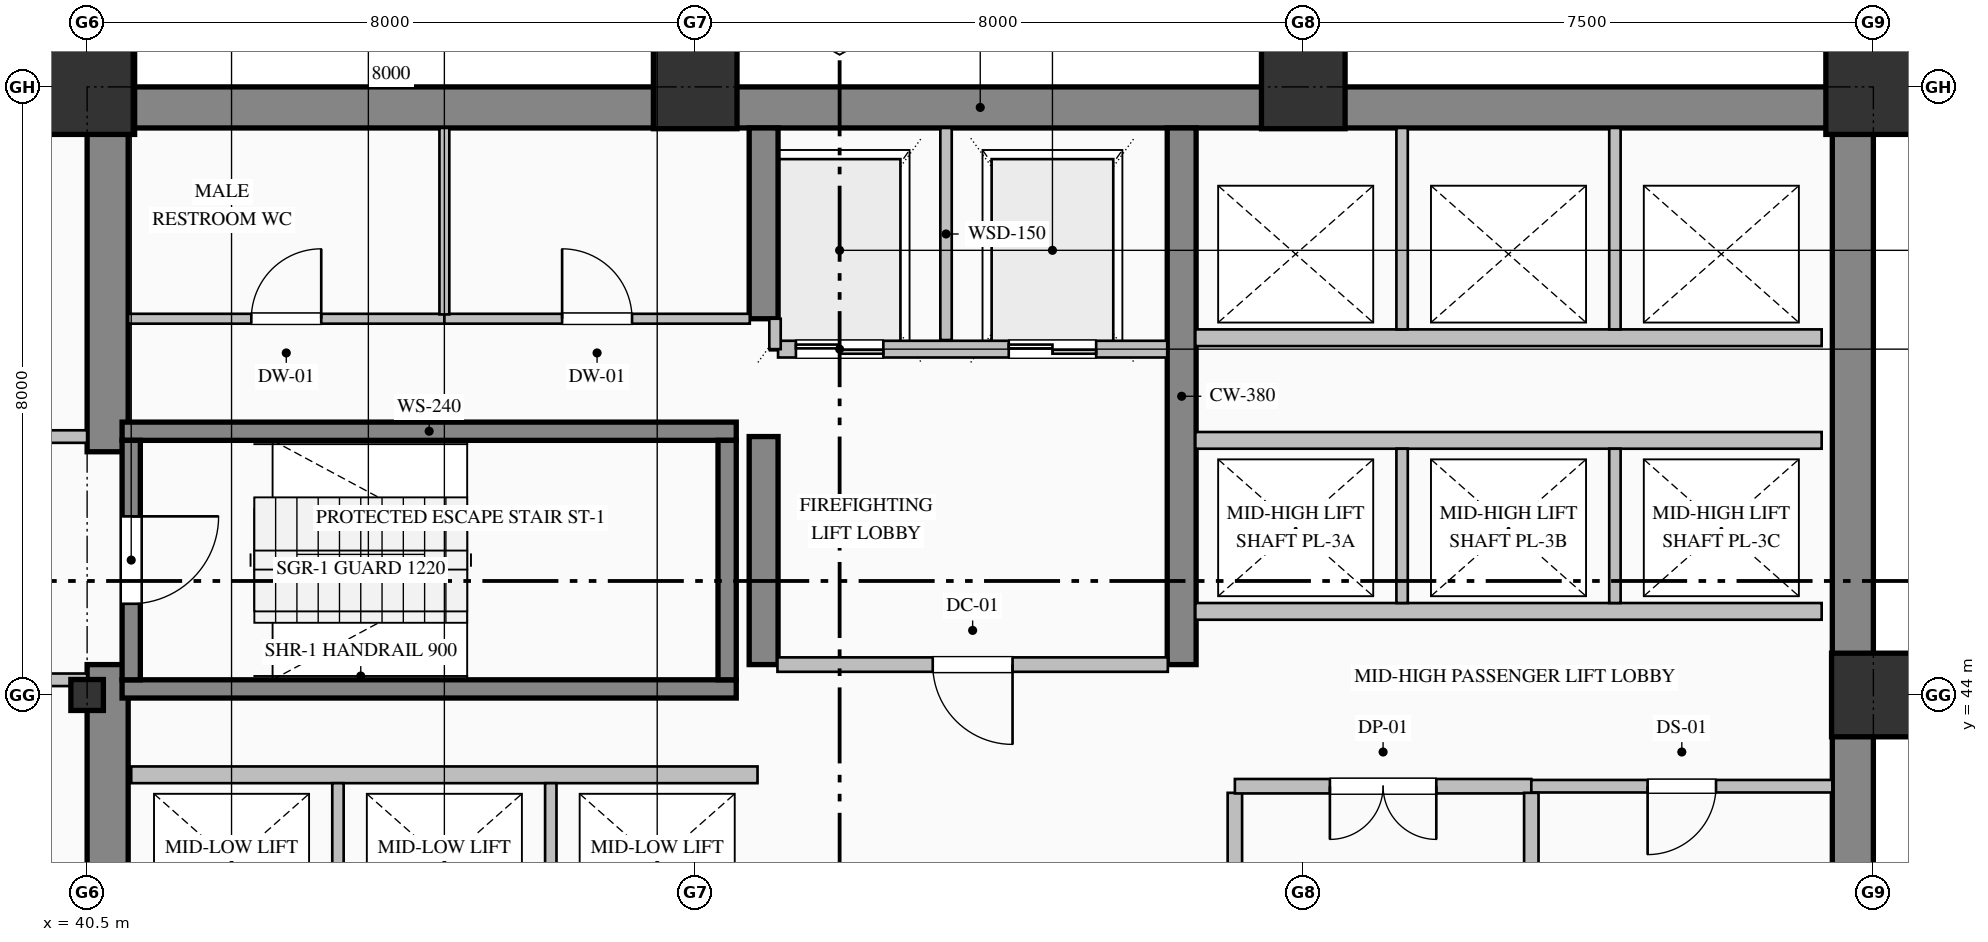
"""IFC4 building model, lengths in metres.
Left out: names, types, materials, properties, quantities, classifications, styles, units other than length and angle.
Written with IfcOpenShell. Run it as: python <this file> out.ifc"""

import sys

from ifc_helpers import new_model, si_unit, direction, frame, frame_2d, origin, origin_2d, place, context, subcontext, project, spatial, rectangle, hollow_rectangle, i_section, extrude, element, fill, save


model = new_model("IFC4")
c1 = context("Model", 3, precision=1e-05, world=origin(), true_north=direction((0.0, 1.0)))
c2 = subcontext(c1, "Body", "Model", "MODEL_VIEW")
j1 = project(units=[si_unit("LENGTHUNIT", "METRE"), si_unit("PLANEANGLEUNIT", "RADIAN")], contexts=[c1])
p1 = place(None, origin())
s1 = spatial("IfcSite", under=j1, at=p1, CompositionType="ELEMENT")
p2 = place(p1, origin())
s2 = spatial("IfcBuilding", under=s1, at=p2, CompositionType="ELEMENT")
p3 = place(p2, frame((0.0, 0.0, 100.2)))
s3 = spatial("IfcBuildingStorey", under=s2, at=p3, CompositionType="ELEMENT", Elevation=100.2)
p4 = place(p3, frame((40.5, 51.73, 0.0), z_axis=(0.0, 0.0, 1.0), x_axis=(1.0, 0.0, 0.0)))
e1 = element("IfcWall", 1, at=p4, inside=s3, PredefinedType="SHEAR", context=c2, shape_type="SweptSolid", body=[
    extrude(rectangle(XDim=23.5, YDim=0.54, at=frame_2d((11.75, 0.0))), origin(), (0.0, 0.0, 1.0), 3.75),
])
p5 = place(p3, frame((63.73, 36.32, 0.0), z_axis=(0.0, 0.0, 1.0), x_axis=(0.0, 1.0, 0.0)))
e2 = element("IfcWall", 2, at=p5, inside=s3, PredefinedType="SHEAR", context=c2, shape_type="SweptSolid", body=[
    extrude(rectangle(XDim=15.14, YDim=0.54, at=frame_2d((7.57, 0.0))), origin(), (0.0, 0.0, 1.0), 3.75),
])
p6 = place(p3, frame((40.77, 36.54, 0.0), z_axis=(0.0, 0.0, 1.0), x_axis=(0.0, 1.0, 0.0)))
e3 = element("IfcWall", 3, at=p6, inside=s3, PredefinedType="SHEAR", context=c2, shape_type="SweptSolid", body=[
    extrude(rectangle(XDim=7.86, YDim=0.54, at=frame_2d((3.93, 0.0))), origin(), (0.0, 0.0, 1.0), 3.75),
])
p7 = place(p3, frame((40.77, 47.2, 0.0), z_axis=(0.0, 0.0, 1.0), x_axis=(0.0, 1.0, 0.0)))
e4 = element("IfcWall", 4, at=p7, inside=s3, PredefinedType="SHEAR", context=c2, shape_type="SweptSolid", body=[
    extrude(rectangle(XDim=4.26, YDim=0.54, at=frame_2d((2.13, 0.0))), origin(), (0.0, 0.0, 1.0), 3.75),
])
p8 = place(p3, frame((49.4, 44.4, 0.0), z_axis=(0.0, 0.0, 1.0), x_axis=(0.0, 1.0, 0.0)))
e5 = element("IfcWall", 5, at=p8, inside=s3, PredefinedType="SHEAR", context=c2, shape_type="SweptSolid", body=[
    extrude(rectangle(XDim=3.0, YDim=0.38, at=frame_2d((1.5, 0.0))), origin(), (0.0, 0.0, 1.0), 3.75),
])
p9 = place(p3, frame((49.4, 48.95, 0.0), z_axis=(0.0, 0.0, 1.0), x_axis=(0.0, 1.0, 0.0)))
e6 = element("IfcWall", 6, at=p9, inside=s3, PredefinedType="SHEAR", context=c2, shape_type="SweptSolid", body=[
    extrude(rectangle(XDim=2.51, YDim=0.38, at=frame_2d((1.255, 0.0))), origin(), (0.0, 0.0, 1.0), 3.75),
])
p10 = place(p3, frame((54.9, 44.4, 0.0), z_axis=(0.0, 0.0, 1.0), x_axis=(0.0, 1.0, 0.0)))
e7 = element("IfcWall", 7, at=p10, inside=s3, PredefinedType="SHEAR", context=c2, shape_type="SweptSolid", body=[
    extrude(rectangle(XDim=7.06, YDim=0.38, at=frame_2d((3.53, 0.0))), origin(), (0.0, 0.0, 1.0), 3.75),
])
p11 = place(p3, frame((40.5, 44.0, 0.0), z_axis=(0.0, 0.0, 1.0), x_axis=(1.0, 0.0, 0.0)))
e8 = element("IfcColumn", 8, at=p11, inside=s3, PredefinedType="COLUMN", context=c2, shape_type="SweptSolid", body=[
    extrude(i_section(OverallWidth=0.407, OverallDepth=0.428, WebThickness=0.02, FlangeThickness=0.035, FilletRadius=0.022, at=origin_2d()), origin(), (0.0, 0.0, 1.0), 4.0),
])
p12 = place(p3, frame((40.5, 52.0, 0.0), z_axis=(0.0, 0.0, 1.0), x_axis=(1.0, 0.0, 0.0)))
e9 = element("IfcColumn", 9, at=p12, inside=s3, PredefinedType="COLUMN", context=c2, shape_type="SweptSolid", body=[
    extrude(hollow_rectangle(XDim=1.25, YDim=1.25, WallThickness=0.045, at=origin_2d()), origin(), (0.0, 0.0, 1.0), 4.0),
])
for number, where, z_axis, x_axis in (
    (10, (48.5, 52.0, 0.0), (0.0, 0.0, 1.0), (1.0, 0.0, 0.0)),
    (11, (56.5, 52.0, 0.0), (0.0, 0.0, 1.0), (1.0, 0.0, 0.0)),
    (12, (64.0, 44.0, 0.0), (0.0, 0.0, 1.0), (1.0, 0.0, 0.0)),
):
    element("IfcColumn", number, at=place(p3, frame(where, z_axis=z_axis, x_axis=x_axis)), inside=s3, PredefinedType="COLUMN", context=c2, shape_type="SweptSolid", body=[
        extrude(hollow_rectangle(XDim=1.1, YDim=1.1, WallThickness=0.04, at=origin_2d()), origin(), (0.0, 0.0, 1.0), 4.0),
    ])
p13 = place(p3, frame((64.0, 52.0, 0.0), z_axis=(0.0, 0.0, 1.0), x_axis=(1.0, 0.0, 0.0)))
e13 = element("IfcColumn", 13, at=p13, inside=s3, PredefinedType="COLUMN", context=c2, shape_type="SweptSolid", body=[
    extrude(hollow_rectangle(XDim=1.25, YDim=1.25, WallThickness=0.045, at=origin_2d()), origin(), (0.0, 0.0, 1.0), 4.0),
])
p14 = place(p3, frame((4.0, 51.82, 0.0), z_axis=(0.0, 0.0, 1.0), x_axis=(1.0, 0.0, 0.0)))
e14 = element("IfcWall", 14, at=p14, inside=s3, PredefinedType="SOLIDWALL", context=c2, shape_type="SweptSolid", body=[
    extrude(rectangle(XDim=36.52, YDim=0.36, at=frame_2d((18.26, 0.0))), origin(), (0.0, 0.0, 1.0), 3.25),
])
p15 = place(p14, frame((6.3, 0.0, 0.85)))
e15 = element("IfcOpeningElement", 15, at=p15, cuts=e14, PredefinedType="OPENING", context=c2, shape_type="SweptSolid", body=[
    extrude(rectangle(XDim=1.8, YDim=2.05, at=frame_2d((0.9, 1.025))), frame((0.0, 0.19, 0.0), z_axis=(0.0, -1.0, 0.0), x_axis=(1.0, 0.0, 0.0)), (0.0, 0.0, 1.0), 0.38),
])
p16 = place(p14, frame((17.1, 0.0, 0.85)))
e16 = element("IfcOpeningElement", 16, at=p16, cuts=e14, PredefinedType="OPENING", context=c2, shape_type="SweptSolid", body=[
    extrude(rectangle(XDim=1.8, YDim=2.05, at=frame_2d((0.9, 1.025))), frame((0.0, 0.19, 0.0), z_axis=(0.0, -1.0, 0.0), x_axis=(1.0, 0.0, 0.0)), (0.0, 0.0, 1.0), 0.38),
])
for number, where, z_axis, x_axis in (
    (17, (40.96, 47.47, 0.0), (0.0, 0.0, 1.0), (1.0, 0.0, 0.0)),
    (18, (49.04, 44.08, 0.0), (0.0, 0.0, 1.0), (-1.0, 0.0, 0.0)),
):
    element("IfcWall", number, at=place(p3, frame(where, z_axis=z_axis, x_axis=x_axis)), inside=s3, PredefinedType="SOLIDWALL", context=c2, shape_type="SweptSolid", body=[
        extrude(rectangle(XDim=8.08, YDim=0.24, at=frame_2d((4.04, 0.0))), origin(), (0.0, 0.0, 1.0), 4.0),
    ])
p17 = place(p3, frame((41.08, 47.35, 0.0), z_axis=(0.0, 0.0, 1.0), x_axis=(0.0, -1.0, 0.0)))
e19 = element("IfcWall", 19, at=p17, inside=s3, PredefinedType="SOLIDWALL", context=c2, shape_type="SweptSolid", body=[
    extrude(rectangle(XDim=3.15, YDim=0.24, at=frame_2d((1.575, 0.0))), origin(), (0.0, 0.0, 1.0), 4.0),
])
p18 = place(p17, frame((1.0, 0.0, 0.0)))
e20 = element("IfcOpeningElement", 20, at=p18, cuts=e19, PredefinedType="OPENING", context=c2, shape_type="SweptSolid", body=[
    extrude(rectangle(XDim=1.15, YDim=2.2, at=frame_2d((0.575, 1.1))), frame((0.0, 0.13, 0.0), z_axis=(0.0, -1.0, 0.0), x_axis=(1.0, 0.0, 0.0)), (0.0, 0.0, 1.0), 0.26),
])
p19 = place(p3, frame((48.92, 44.2, 0.0), z_axis=(0.0, 0.0, 1.0), x_axis=(0.0, 1.0, 0.0)))
e21 = element("IfcWall", 21, at=p19, inside=s3, PredefinedType="SOLIDWALL", context=c2, shape_type="SweptSolid", body=[
    extrude(rectangle(XDim=3.15, YDim=0.24, at=frame_2d((1.575, 0.0))), origin(), (0.0, 0.0, 1.0), 4.0),
])
p20 = place(p3, frame((54.71, 48.55, 0.0), z_axis=(0.0, 0.0, 1.0), x_axis=(-1.0, 0.0, 0.0)))
e22 = element("IfcWall", 22, at=p20, inside=s3, PredefinedType="PARTITIONING", context=c2, shape_type="SweptSolid", body=[
    extrude(rectangle(XDim=5.12, YDim=0.22, at=frame_2d((2.56, 0.0))), origin(), (0.0, 0.0, 1.0), 3.75),
])
p21 = place(p20, frame((3.735, 0.0, 0.0)))
e23 = element("IfcOpeningElement", 23, at=p21, cuts=e22, PredefinedType="OPENING", context=c2, shape_type="SweptSolid", body=[
    extrude(rectangle(XDim=1.15, YDim=2.2, at=frame_2d((0.575, 1.1))), frame((0.0, 0.12, 0.0), z_axis=(0.0, -1.0, 0.0), x_axis=(1.0, 0.0, 0.0)), (0.0, 0.0, 1.0), 0.24),
])
p22 = place(p20, frame((0.935, 0.0, 0.0)))
e24 = element("IfcOpeningElement", 24, at=p22, cuts=e22, PredefinedType="OPENING", context=c2, shape_type="SweptSolid", body=[
    extrude(rectangle(XDim=1.15, YDim=2.2, at=frame_2d((0.575, 1.1))), frame((0.0, 0.12, 0.0), z_axis=(0.0, -1.0, 0.0), x_axis=(1.0, 0.0, 0.0)), (0.0, 0.0, 1.0), 0.24),
])
p23 = place(p3, frame((51.8, 48.67, 0.0), z_axis=(0.0, 0.0, 1.0), x_axis=(0.0, 1.0, 0.0)))
e25 = element("IfcWall", 25, at=p23, inside=s3, PredefinedType="PARTITIONING", context=c2, shape_type="SweptSolid", body=[
    extrude(rectangle(XDim=2.79, YDim=0.15, at=frame_2d((1.395, 0.0))), origin(), (0.0, 0.0, 1.0), 3.75),
])
p24 = place(p3, frame((49.55, 48.55, 0.0), z_axis=(0.0, 0.0, 1.0), x_axis=(0.0, 1.0, 0.0)))
e26 = element("IfcWall", 26, at=p24, inside=s3, PredefinedType="PARTITIONING", context=c2, shape_type="SweptSolid", body=[
    extrude(rectangle(XDim=0.4, YDim=0.15, at=frame_2d((0.2, 0.0))), origin(), (0.0, 0.0, 1.0), 3.75),
])
p25 = place(p3, frame((41.08, 42.95, 0.0), z_axis=(0.0, 0.0, 1.0), x_axis=(1.0, 0.0, 0.0)))
e27 = element("IfcWall", 27, at=p25, inside=s3, PredefinedType="PARTITIONING", context=c2, shape_type="SweptSolid", body=[
    extrude(rectangle(XDim=8.24, YDim=0.22, at=frame_2d((4.12, 0.0))), origin(), (0.0, 0.0, 1.0), 3.75),
])
for number, where, z_axis, x_axis in (
    (28, (43.8, 40.76, 0.0), (0.0, 0.0, 1.0), (0.0, 1.0, 0.0)),
    (29, (46.6, 40.76, 0.0), (0.0, 0.0, 1.0), (0.0, 1.0, 0.0)),
):
    element("IfcWall", number, at=place(p3, frame(where, z_axis=z_axis, x_axis=x_axis)), inside=s3, PredefinedType="PARTITIONING", context=c2, shape_type="SweptSolid", body=[
        extrude(rectangle(XDim=2.08, YDim=0.15, at=frame_2d((1.04, 0.0))), origin(), (0.0, 0.0, 1.0), 3.75),
    ])
for number, where, z_axis, x_axis in (
    (30, (63.32, 45.1, 0.0), (0.0, 0.0, 1.0), (-1.0, 0.0, 0.0)),
    (31, (55.08, 47.35, 0.0), (0.0, 0.0, 1.0), (1.0, 0.0, 0.0)),
):
    element("IfcWall", number, at=place(p3, frame(where, z_axis=z_axis, x_axis=x_axis)), inside=s3, PredefinedType="PARTITIONING", context=c2, shape_type="SweptSolid", body=[
        extrude(rectangle(XDim=8.24, YDim=0.22, at=frame_2d((4.12, 0.0))), origin(), (0.0, 0.0, 1.0), 3.75),
    ])
for number, where, z_axis, x_axis in (
    (32, (57.8, 45.21, 0.0), (0.0, 0.0, 1.0), (0.0, 1.0, 0.0)),
    (33, (60.6, 45.21, 0.0), (0.0, 0.0, 1.0), (0.0, 1.0, 0.0)),
):
    element("IfcWall", number, at=place(p3, frame(where, z_axis=z_axis, x_axis=x_axis)), inside=s3, PredefinedType="PARTITIONING", context=c2, shape_type="SweptSolid", body=[
        extrude(rectangle(XDim=2.03, YDim=0.15, at=frame_2d((1.015, 0.0))), origin(), (0.0, 0.0, 1.0), 3.75),
    ])
p26 = place(p3, frame((63.32, 48.7, 0.0), z_axis=(0.0, 0.0, 1.0), x_axis=(-1.0, 0.0, 0.0)))
e34 = element("IfcWall", 34, at=p26, inside=s3, PredefinedType="PARTITIONING", context=c2, shape_type="SweptSolid", body=[
    extrude(rectangle(XDim=8.24, YDim=0.22, at=frame_2d((4.12, 0.0))), origin(), (0.0, 0.0, 1.0), 3.75),
])
for number, where, z_axis, x_axis in (
    (35, (57.8, 48.81, 0.0), (0.0, 0.0, 1.0), (0.0, 1.0, 0.0)),
    (36, (60.6, 48.81, 0.0), (0.0, 0.0, 1.0), (0.0, 1.0, 0.0)),
):
    element("IfcWall", number, at=place(p3, frame(where, z_axis=z_axis, x_axis=x_axis)), inside=s3, PredefinedType="PARTITIONING", context=c2, shape_type="SweptSolid", body=[
        extrude(rectangle(XDim=2.65, YDim=0.15, at=frame_2d((1.325, 0.0))), origin(), (0.0, 0.0, 1.0), 3.75),
    ])
p27 = place(p3, frame((37.8, 47.4, 0.0), z_axis=(0.0, 0.0, 1.0), x_axis=(1.0, 0.0, 0.0)))
e37 = element("IfcWall", 37, at=p27, inside=s3, PredefinedType="PARTITIONING", context=c2, shape_type="SweptSolid", body=[
    extrude(rectangle(XDim=2.7, YDim=0.165, at=frame_2d((1.35, 0.0))), origin(), (0.0, 0.0, 1.0), 3.75),
])
p28 = place(p27, frame((0.825, 0.0, 0.0)))
e38 = element("IfcOpeningElement", 38, at=p28, cuts=e37, PredefinedType="OPENING", context=c2, shape_type="SweptSolid", body=[
    extrude(rectangle(XDim=1.05, YDim=2.15, at=frame_2d((0.525, 1.075))), frame((0.0, 0.093, 0.0), z_axis=(0.0, -1.0, 0.0), x_axis=(1.0, 0.0, 0.0)), (0.0, 0.0, 1.0), 0.185),
])
p29 = place(p3, frame((40.5, 44.2, 0.0), z_axis=(0.0, 0.0, 1.0), x_axis=(-1.0, 0.0, 0.0)))
e39 = element("IfcWall", 39, at=p29, inside=s3, PredefinedType="PARTITIONING", context=c2, shape_type="SweptSolid", body=[
    extrude(rectangle(XDim=2.7, YDim=0.165, at=frame_2d((1.35, 0.0))), origin(), (0.0, 0.0, 1.0), 3.75),
])
p30 = place(p29, frame((0.825, 0.0, 0.0)))
e40 = element("IfcOpeningElement", 40, at=p30, cuts=e39, PredefinedType="OPENING", context=c2, shape_type="SweptSolid", body=[
    extrude(rectangle(XDim=1.05, YDim=2.15, at=frame_2d((0.525, 1.075))), frame((0.0, 0.093, 0.0), z_axis=(0.0, -1.0, 0.0), x_axis=(1.0, 0.0, 0.0)), (0.0, 0.0, 1.0), 0.185),
])
p31 = place(p3, frame((41.04, 48.95, 0.0), z_axis=(0.0, 0.0, 1.0), x_axis=(1.0, 0.0, 0.0)))
e41 = element("IfcWall", 41, at=p31, inside=s3, PredefinedType="PARTITIONING", context=c2, shape_type="SweptSolid", body=[
    extrude(rectangle(XDim=4.16, YDim=0.13, at=frame_2d((2.08, 0.0))), origin(), (0.0, 0.0, 1.0), 3.75),
])
p32 = place(p31, frame((1.62, 0.0, 0.0)))
e42 = element("IfcOpeningElement", 42, at=p32, cuts=e41, PredefinedType="OPENING", context=c2, shape_type="SweptSolid", body=[
    extrude(rectangle(XDim=0.92, YDim=2.15, at=frame_2d((0.46, 1.075))), frame((0.0, 0.075, 0.0), z_axis=(0.0, -1.0, 0.0), x_axis=(1.0, 0.0, 0.0)), (0.0, 0.0, 1.0), 0.15),
])
p33 = place(p3, frame((45.2, 48.95, 0.0), z_axis=(0.0, 0.0, 1.0), x_axis=(1.0, 0.0, 0.0)))
e43 = element("IfcWall", 43, at=p33, inside=s3, PredefinedType="PARTITIONING", context=c2, shape_type="SweptSolid", body=[
    extrude(rectangle(XDim=4.018, YDim=0.13, at=frame_2d((2.009, 0.0))), origin(), (0.0, 0.0, 1.0), 3.75),
])
p34 = place(p33, frame((1.549, 0.0, 0.0)))
e44 = element("IfcOpeningElement", 44, at=p34, cuts=e43, PredefinedType="OPENING", context=c2, shape_type="SweptSolid", body=[
    extrude(rectangle(XDim=0.92, YDim=2.15, at=frame_2d((0.46, 1.075))), frame((0.0, 0.075, 0.0), z_axis=(0.0, -1.0, 0.0), x_axis=(1.0, 0.0, 0.0)), (0.0, 0.0, 1.0), 0.15),
])
p35 = place(p3, frame((54.718, 44.4, 0.0), z_axis=(0.0, 0.0, 1.0), x_axis=(-1.0, 0.0, 0.0)))
e45 = element("IfcWall", 45, at=p35, inside=s3, PredefinedType="PARTITIONING", context=c2, shape_type="SweptSolid", body=[
    extrude(rectangle(XDim=5.136, YDim=0.19, at=frame_2d((2.568, 0.0))), origin(), (0.0, 0.0, 1.0), 3.75),
])
p36 = place(p35, frame((2.043, 0.0, 0.0)))
e46 = element("IfcOpeningElement", 46, at=p36, cuts=e45, PredefinedType="OPENING", context=c2, shape_type="SweptSolid", body=[
    extrude(rectangle(XDim=1.05, YDim=2.15, at=frame_2d((0.525, 1.075))), frame((0.0, 0.105, 0.0), z_axis=(0.0, -1.0, 0.0), x_axis=(1.0, 0.0, 0.0)), (0.0, 0.0, 1.0), 0.21),
])
p37 = place(p3, frame((55.6, 42.713, 0.0), z_axis=(0.0, 0.0, 1.0), x_axis=(0.0, -1.0, 0.0)))
e47 = element("IfcWall", 47, at=p37, inside=s3, PredefinedType="PARTITIONING", context=c2, shape_type="SweptSolid", body=[
    extrude(rectangle(XDim=2.731, YDim=0.19, at=frame_2d((1.365, 0.0))), origin(), (0.0, 0.0, 1.0), 3.75),
])
p38 = place(p3, frame((59.5, 42.8, 0.0), z_axis=(0.0, 0.0, 1.0), x_axis=(-1.0, 0.0, 0.0)))
e48 = element("IfcWall", 48, at=p38, inside=s3, PredefinedType="PARTITIONING", context=c2, shape_type="SweptSolid", body=[
    extrude(rectangle(XDim=3.9, YDim=0.19, at=frame_2d((1.95, 0.0))), origin(), (0.0, 0.0, 1.0), 3.75),
])
p39 = place(p38, frame((1.25, 0.0, 0.0)))
e49 = element("IfcOpeningElement", 49, at=p39, cuts=e48, PredefinedType="OPENING", context=c2, shape_type="SweptSolid", body=[
    extrude(rectangle(XDim=1.4, YDim=2.25, at=frame_2d((0.7, 1.125))), frame((0.0, 0.105, 0.0), z_axis=(0.0, -1.0, 0.0), x_axis=(1.0, 0.0, 0.0)), (0.0, 0.0, 1.0), 0.21),
])
p40 = place(p3, frame((63.46, 42.8, 0.0), z_axis=(0.0, 0.0, 1.0), x_axis=(-1.0, 0.0, 0.0)))
e50 = element("IfcWall", 50, at=p40, inside=s3, PredefinedType="PARTITIONING", context=c2, shape_type="SweptSolid", body=[
    extrude(rectangle(XDim=3.96, YDim=0.165, at=frame_2d((1.98, 0.0))), origin(), (0.0, 0.0, 1.0), 3.75),
])
p41 = place(p40, frame((1.53, 0.0, 0.0)))
e51 = element("IfcOpeningElement", 51, at=p41, cuts=e50, PredefinedType="OPENING", context=c2, shape_type="SweptSolid", body=[
    extrude(rectangle(XDim=0.9, YDim=2.15, at=frame_2d((0.45, 1.075))), frame((0.0, 0.093, 0.0), z_axis=(0.0, -1.0, 0.0), x_axis=(1.0, 0.0, 0.0)), (0.0, 0.0, 1.0), 0.185),
])
p42 = place(p3, frame((45.2, 51.46, 0.0), z_axis=(0.0, 0.0, 1.0), x_axis=(0.0, -1.0, 0.0)))
e52 = element("IfcWall", 52, at=p42, inside=s3, PredefinedType="PARTITIONING", context=c2, shape_type="SweptSolid", body=[
    extrude(rectangle(XDim=2.453, YDim=0.13, at=frame_2d((1.227, 0.0))), origin(), (0.0, 0.0, 1.0), 3.75),
])
p43 = place(p3, frame((59.5, 42.713, 0.0), z_axis=(0.0, 0.0, 1.0), x_axis=(0.0, -1.0, 0.0)))
e53 = element("IfcWall", 53, at=p43, inside=s3, PredefinedType="PARTITIONING", context=c2, shape_type="SweptSolid", body=[
    extrude(rectangle(XDim=2.731, YDim=0.19, at=frame_2d((1.365, 0.0))), origin(), (0.0, 0.0, 1.0), 3.75),
])
p44 = place(p18, origin())
e54 = element("IfcDoor", 54, at=p44, inside=s3, OperationType="SINGLE_SWING_LEFT", PredefinedType="DOOR", context=c2, shape_type="SweptSolid", body=[
    extrude(rectangle(XDim=1.15, YDim=2.2, at=frame_2d((0.575, 1.1))), frame((0.0, 0.025, 0.0), z_axis=(0.0, -1.0, 0.0), x_axis=(1.0, 0.0, 0.0)), (0.0, 0.0, 1.0), 0.05),
])
fill(e20, e54)
p45 = place(p21, origin())
e55 = element("IfcDoor", 55, at=p45, inside=s3, OperationType="DOUBLE_DOOR_SLIDING", PredefinedType="DOOR", context=c2, shape_type="SweptSolid", body=[
    extrude(rectangle(XDim=1.15, YDim=2.2, at=frame_2d((0.575, 1.1))), frame((0.0, 0.025, 0.0), z_axis=(0.0, -1.0, 0.0), x_axis=(1.0, 0.0, 0.0)), (0.0, 0.0, 1.0), 0.05),
])
fill(e23, e55)
p46 = place(p22, origin())
e56 = element("IfcDoor", 56, at=p46, inside=s3, OperationType="DOUBLE_DOOR_SLIDING", PredefinedType="DOOR", context=c2, shape_type="SweptSolid", body=[
    extrude(rectangle(XDim=1.15, YDim=2.2, at=frame_2d((0.575, 1.1))), frame((0.0, 0.025, 0.0), z_axis=(0.0, -1.0, 0.0), x_axis=(1.0, 0.0, 0.0)), (0.0, 0.0, 1.0), 0.05),
])
fill(e24, e56)
p47 = place(p36, origin())
e57 = element("IfcDoor", 57, at=p47, inside=s3, OperationType="SINGLE_SWING_LEFT", PredefinedType="DOOR", context=c2, shape_type="SweptSolid", body=[
    extrude(rectangle(XDim=1.05, YDim=2.15, at=frame_2d((0.525, 1.075))), frame((0.0, 0.025, 0.0), z_axis=(0.0, -1.0, 0.0), x_axis=(1.0, 0.0, 0.0)), (0.0, 0.0, 1.0), 0.05),
])
fill(e46, e57)
p48 = place(p32, origin())
e58 = element("IfcDoor", 58, at=p48, inside=s3, OperationType="SINGLE_SWING_RIGHT", PredefinedType="DOOR", context=c2, shape_type="SweptSolid", body=[
    extrude(rectangle(XDim=0.92, YDim=2.15, at=frame_2d((0.46, 1.075))), frame((0.0, 0.025, 0.0), z_axis=(0.0, -1.0, 0.0), x_axis=(1.0, 0.0, 0.0)), (0.0, 0.0, 1.0), 0.05),
])
fill(e42, e58)
p49 = place(p34, origin())
e59 = element("IfcDoor", 59, at=p49, inside=s3, OperationType="SINGLE_SWING_LEFT", PredefinedType="DOOR", context=c2, shape_type="SweptSolid", body=[
    extrude(rectangle(XDim=0.92, YDim=2.15, at=frame_2d((0.46, 1.075))), frame((0.0, 0.025, 0.0), z_axis=(0.0, -1.0, 0.0), x_axis=(1.0, 0.0, 0.0)), (0.0, 0.0, 1.0), 0.05),
])
fill(e44, e59)
p50 = place(p39, origin())
e60 = element("IfcDoor", 60, at=p50, inside=s3, OperationType="DOUBLE_DOOR_SINGLE_SWING", PredefinedType="DOOR", context=c2, shape_type="SweptSolid", body=[
    extrude(rectangle(XDim=1.4, YDim=2.25, at=frame_2d((0.7, 1.125))), frame((0.0, 0.025, 0.0), z_axis=(0.0, -1.0, 0.0), x_axis=(1.0, 0.0, 0.0)), (0.0, 0.0, 1.0), 0.05),
])
fill(e49, e60)
p51 = place(p41, origin())
e61 = element("IfcDoor", 61, at=p51, inside=s3, OperationType="SINGLE_SWING_RIGHT", PredefinedType="DOOR", context=c2, shape_type="SweptSolid", body=[
    extrude(rectangle(XDim=0.9, YDim=2.15, at=frame_2d((0.45, 1.075))), frame((0.0, 0.025, 0.0), z_axis=(0.0, -1.0, 0.0), x_axis=(1.0, 0.0, 0.0)), (0.0, 0.0, 1.0), 0.05),
])
fill(e51, e61)
save(model, sys.argv[1])
